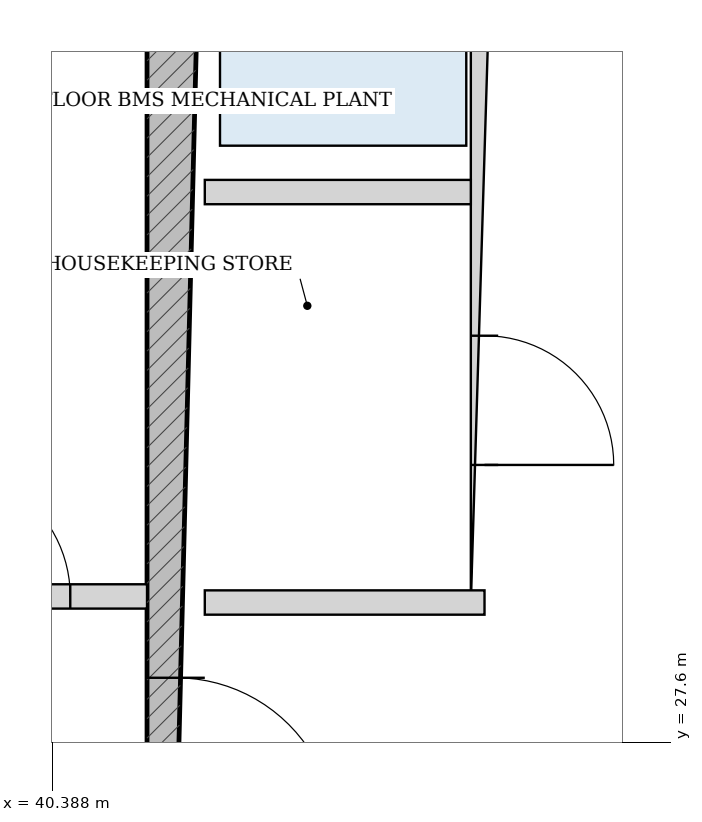
"""IFC4 building model, lengths in metres.
Left out: names, types, materials, properties, quantities, classifications, styles, units other than length and angle.
Written with IfcOpenShell. Run it as: python <this file> out.ifc"""

import sys

from ifc_helpers import new_model, si_unit, direction, frame, frame_2d, origin, place, context, subcontext, project, spatial, rectangle, extrude, source, transform, mapped, element, fill, save


model = new_model("IFC4")
c1 = context("Model", 3, precision=1e-05, world=origin(), true_north=direction((-0.2419218956, 0.970295726276)))
c2 = subcontext(c1, "Body", "Model", "MODEL_VIEW")
j1 = project(units=[si_unit("LENGTHUNIT", "METRE"), si_unit("PLANEANGLEUNIT", "RADIAN")], contexts=[c1])
p1 = place(None, origin())
s1 = spatial("IfcSite", under=j1, at=p1, CompositionType="ELEMENT")
p2 = place(p1, origin())
s2 = spatial("IfcBuilding", under=s1, at=p2, CompositionType="ELEMENT")
p3 = place(p2, frame((0.0, 0.0, 213.4)))
s3 = spatial("IfcBuildingStorey", under=s2, at=p3, CompositionType="ELEMENT", Elevation=213.4)
p4 = place(p3, frame((41.2, 19.175, 0.0), z_axis=(0.0, 0.0, 1.0), x_axis=(0.0, 1.0, 0.0)))
e1 = element("IfcWall", 1, at=p4, inside=s3, PredefinedType="SHEAR", context=c2, shape_type="SweptSolid", body=[
    extrude(rectangle(XDim=15.25, YDim=0.38, at=frame_2d((7.625, 0.0))), origin(), (0.0, 0.0, 1.0), 3.435),
])
p5 = place(p4, frame((7.8, 0.0, 0.0)))
e2 = element("IfcOpeningElement", 2, at=p5, cuts=e1, PredefinedType="OPENING", context=c2, shape_type="SweptSolid", body=[
    extrude(rectangle(XDim=1.05, YDim=2.15, at=frame_2d((0.525, 1.075))), frame((0.0, 0.2, 0.0), z_axis=(0.0, -1.0, 0.0), x_axis=(1.0, 0.0, 0.0)), (0.0, 0.0, 1.0), 0.4),
])
p6 = place(p3, frame((43.23, 28.52, 0.0), z_axis=(0.0, 0.0, 1.0), x_axis=(0.0, 1.0, 0.0)))
e3 = element("IfcWall", 3, at=p6, inside=s3, PredefinedType="PARTITIONING", context=c2, shape_type="SweptSolid", body=[
    extrude(rectangle(XDim=5.905, YDim=0.18, at=frame_2d((2.953, 0.0))), origin(), (0.0, 0.0, 1.0), 3.435),
])
p7 = place(p6, frame((0.905, 0.0, 0.0)))
e4 = element("IfcOpeningElement", 4, at=p7, cuts=e3, PredefinedType="OPENING", context=c2, shape_type="SweptSolid", body=[
    extrude(rectangle(XDim=0.85, YDim=2.1, at=frame_2d((0.425, 1.05))), frame((0.0, 0.1, 0.0), z_axis=(0.0, -1.0, 0.0), x_axis=(1.0, 0.0, 0.0)), (0.0, 0.0, 1.0), 0.2),
])
p8 = place(p6, frame((3.655, 0.0, 0.0)))
e5 = element("IfcOpeningElement", 5, at=p8, cuts=e3, PredefinedType="OPENING", context=c2, shape_type="SweptSolid", body=[
    extrude(rectangle(XDim=1.15, YDim=2.2, at=frame_2d((0.575, 1.1))), frame((0.0, 0.1, 0.0), z_axis=(0.0, -1.0, 0.0), x_axis=(1.0, 0.0, 0.0)), (0.0, 0.0, 1.0), 0.2),
])
p9 = place(p3, frame((41.39, 31.22, 0.0), z_axis=(0.0, 0.0, 1.0), x_axis=(1.0, 0.0, 0.0)))
e6 = element("IfcWall", 6, at=p9, inside=s3, PredefinedType="PARTITIONING", context=c2, shape_type="SweptSolid", body=[
    extrude(rectangle(XDim=1.75, YDim=0.16, at=frame_2d((0.875, 0.0))), origin(), (0.0, 0.0, 1.0), 3.435),
])
p10 = place(p3, frame((41.39, 28.52, 0.0), z_axis=(0.0, 0.0, 1.0), x_axis=(1.0, 0.0, 0.0)))
e7 = element("IfcWall", 7, at=p10, inside=s3, PredefinedType="PARTITIONING", context=c2, shape_type="SweptSolid", body=[
    extrude(rectangle(XDim=1.84, YDim=0.16, at=frame_2d((0.92, 0.0))), origin(), (0.0, 0.0, 1.0), 3.435),
])
p11 = place(p3, frame((34.99, 28.56, 0.0), z_axis=(0.0, 0.0, 1.0), x_axis=(1.0, 0.0, 0.0)))
e8 = element("IfcWall", 8, at=p11, inside=s3, PredefinedType="PARTITIONING", context=c2, shape_type="SweptSolid", body=[
    extrude(rectangle(XDim=6.02, YDim=0.16, at=frame_2d((3.01, 0.0))), origin(), (0.0, 0.0, 1.0), 3.435),
])
p12 = place(p11, frame((0.505, 0.0, 0.0)))
e9 = element("IfcOpeningElement", 9, at=p12, cuts=e8, PredefinedType="OPENING", context=c2, shape_type="SweptSolid", body=[
    extrude(rectangle(XDim=0.85, YDim=2.1, at=frame_2d((0.425, 1.05))), frame((0.0, 0.09, 0.0), z_axis=(0.0, -1.0, 0.0), x_axis=(1.0, 0.0, 0.0)), (0.0, 0.0, 1.0), 0.18),
])
p13 = place(p11, frame((2.58, 0.0, 0.0)))
e10 = element("IfcOpeningElement", 10, at=p13, cuts=e8, PredefinedType="OPENING", context=c2, shape_type="SweptSolid", body=[
    extrude(rectangle(XDim=0.86, YDim=2.1, at=frame_2d((0.43, 1.05))), frame((0.0, 0.09, 0.0), z_axis=(0.0, -1.0, 0.0), x_axis=(1.0, 0.0, 0.0)), (0.0, 0.0, 1.0), 0.18),
])
p14 = place(p11, frame((4.665, 0.0, 0.0)))
e11 = element("IfcOpeningElement", 11, at=p14, cuts=e8, PredefinedType="OPENING", context=c2, shape_type="SweptSolid", body=[
    extrude(rectangle(XDim=0.85, YDim=2.1, at=frame_2d((0.425, 1.05))), frame((0.0, 0.09, 0.0), z_axis=(0.0, -1.0, 0.0), x_axis=(1.0, 0.0, 0.0)), (0.0, 0.0, 1.0), 0.18),
])
m1 = source(origin(), c2, "Body", "SweptSolid", [
    extrude(rectangle(XDim=1.05, YDim=2.15, at=frame_2d((0.525, 1.075))), frame((0.0, 0.025, 0.0), z_axis=(0.0, -1.0, 0.0), x_axis=(1.0, 0.0, 0.0)), (0.0, 0.0, 1.0), 0.05),
])
p15 = place(p5, frame((1.05, 0.0, 0.0), z_axis=(0.0, 0.0, 1.0), x_axis=(-1.0, 0.0, 0.0)))
e12 = element("IfcDoor", 12, at=p15, inside=s3, OperationType="SINGLE_SWING_RIGHT", PredefinedType="DOOR", context=c2, shape_type="MappedRepresentation", body=[
    mapped(m1, transform((0.0, 0.0, 0.0), scale=1.0)),
])
fill(e2, e12)
m2 = source(origin(), c2, "Body", "SweptSolid", [
    extrude(rectangle(XDim=0.85, YDim=2.1, at=frame_2d((0.425, 1.05))), frame((0.0, 0.025, 0.0), z_axis=(0.0, -1.0, 0.0), x_axis=(1.0, 0.0, 0.0)), (0.0, 0.0, 1.0), 0.05),
])
p16 = place(p7, frame((0.85, 0.0, 0.0), z_axis=(0.0, 0.0, 1.0), x_axis=(-1.0, 0.0, 0.0)))
e13 = element("IfcDoor", 13, at=p16, inside=s3, OperationType="SINGLE_SWING_RIGHT", PredefinedType="DOOR", context=c2, shape_type="MappedRepresentation", body=[
    mapped(m2, transform((0.0, 0.0, 0.0), scale=1.0)),
])
fill(e4, e13)
p17 = place(p14, origin())
e14 = element("IfcDoor", 14, at=p17, inside=s3, OperationType="SINGLE_SWING_LEFT", PredefinedType="DOOR", context=c2, shape_type="MappedRepresentation", body=[
    mapped(m2, transform((0.0, 0.0, 0.0), scale=1.0)),
])
fill(e11, e14)
save(model, sys.argv[1])
